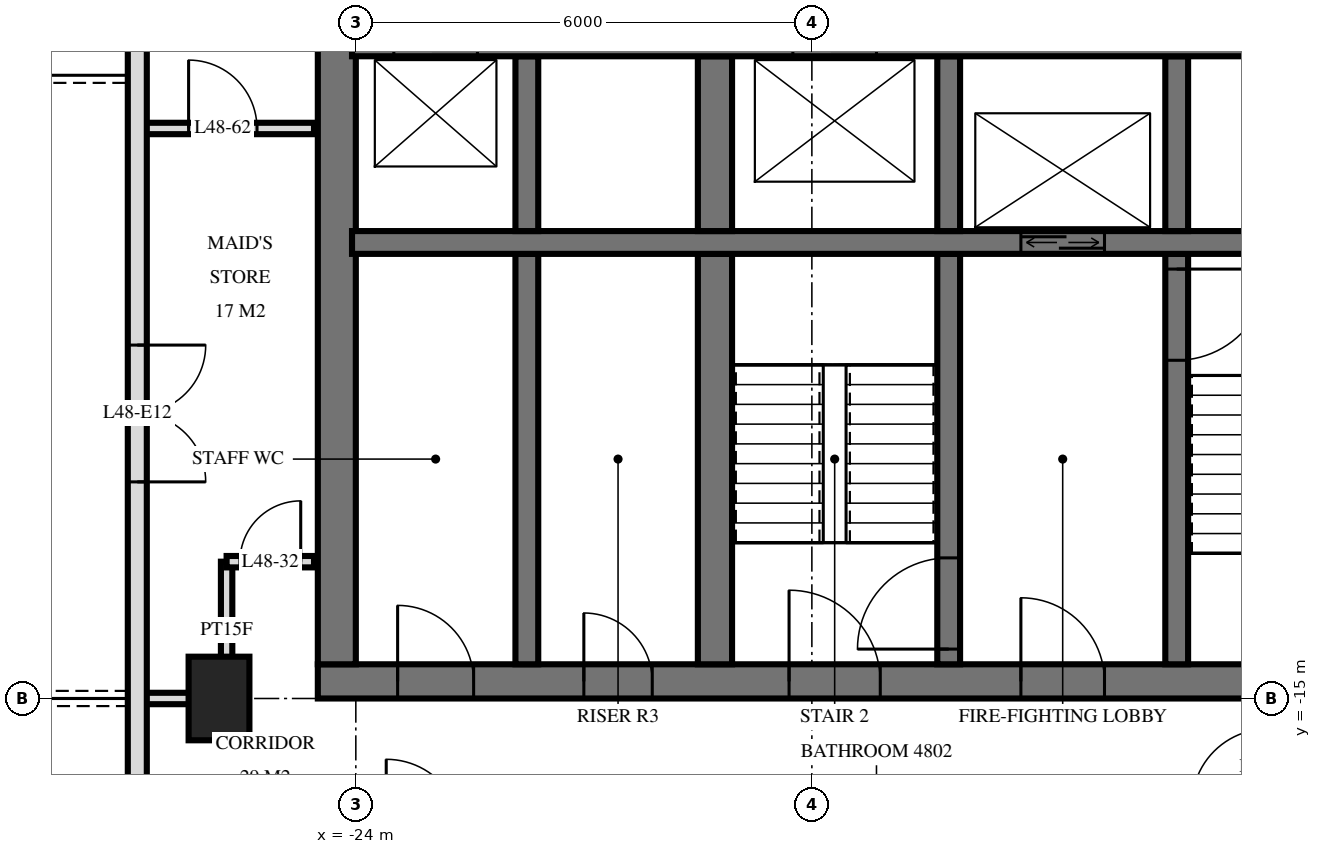
"""IFC4 building model, lengths in metres.
Left out: names, types, materials, properties, quantities, classifications, styles, units other than length and angle.
Written with IfcOpenShell. Run it as: python <this file> out.ifc"""

import sys

from ifc_helpers import new_model, si_unit, direction, frame, frame_2d, origin, origin_2d, place, context, subcontext, project, spatial, rectangle, extrude, element, fill, save


model = new_model("IFC4")
c1 = context("Model", 3, precision=1e-05, world=origin(), true_north=direction((0.0, 1.0)))
c2 = subcontext(c1, "Body", "Model", "MODEL_VIEW")
j1 = project(units=[si_unit("LENGTHUNIT", "METRE"), si_unit("PLANEANGLEUNIT", "RADIAN")], contexts=[c1])
p1 = place(None, origin())
s1 = spatial("IfcSite", under=j1, at=p1, CompositionType="ELEMENT")
p2 = place(p1, origin())
s2 = spatial("IfcBuilding", under=s1, at=p2, CompositionType="ELEMENT")
p3 = place(p2, frame((0.0, 0.0, 187.1)))
s3 = spatial("IfcBuildingStorey", under=s2, at=p3, CompositionType="ELEMENT", Elevation=187.1)
p4 = place(p3, frame((-25.8, -15.0, 0.0), z_axis=(0.0, 0.0, 1.0), x_axis=(0.0, 1.0, 0.0)))
e1 = element("IfcColumn", 1, at=p4, inside=s3, PredefinedType="COLUMN", context=c2, shape_type="SweptSolid", body=[
    extrude(rectangle(XDim=1.1, YDim=0.8, at=origin_2d()), origin(), (0.0, 0.0, 1.0), 3.5),
])
p5 = place(p3, frame((-24.5, -14.775, 0.0), z_axis=(0.0, 0.0, 1.0), x_axis=(1.0, 0.0, 0.0)))
e2 = element("IfcWall", 2, at=p5, inside=s3, PredefinedType="SHEAR", context=c2, shape_type="SweptSolid", body=[
    extrude(rectangle(XDim=14.5, YDim=0.45, at=frame_2d((7.25, 0.0))), origin(), (0.0, 0.0, 1.0), 3.5),
])
p6 = place(p5, frame((6.2, 0.0, 0.0)))
e3 = element("IfcOpeningElement", 3, at=p6, cuts=e2, PredefinedType="OPENING", context=c2, shape_type="SweptSolid", body=[
    extrude(rectangle(XDim=1.2, YDim=2.1, at=frame_2d((0.6, 1.05))), frame((0.0, 0.235, 0.0), z_axis=(0.0, -1.0, 0.0), x_axis=(1.0, 0.0, 0.0)), (0.0, 0.0, 1.0), 0.47),
])
p7 = place(p5, frame((9.25, 0.0, 0.0)))
e4 = element("IfcOpeningElement", 4, at=p7, cuts=e2, PredefinedType="OPENING", context=c2, shape_type="SweptSolid", body=[
    extrude(rectangle(XDim=1.1, YDim=2.1, at=frame_2d((0.55, 1.05))), frame((0.0, 0.235, 0.0), z_axis=(0.0, -1.0, 0.0), x_axis=(1.0, 0.0, 0.0)), (0.0, 0.0, 1.0), 0.47),
])
p8 = place(p5, frame((3.5, 0.0, 0.0)))
e5 = element("IfcOpeningElement", 5, at=p8, cuts=e2, PredefinedType="OPENING", context=c2, shape_type="SweptSolid", body=[
    extrude(rectangle(XDim=0.9, YDim=2.1, at=frame_2d((0.45, 1.05))), frame((0.0, 0.235, 0.0), z_axis=(0.0, -1.0, 0.0), x_axis=(1.0, 0.0, 0.0)), (0.0, 0.0, 1.0), 0.47),
])
p9 = place(p5, frame((1.05, 0.0, 0.0)))
e6 = element("IfcOpeningElement", 6, at=p9, cuts=e2, PredefinedType="OPENING", context=c2, shape_type="SweptSolid", body=[
    extrude(rectangle(XDim=1.0, YDim=2.1, at=frame_2d((0.5, 1.05))), frame((0.0, 0.235, 0.0), z_axis=(0.0, -1.0, 0.0), x_axis=(1.0, 0.0, 0.0)), (0.0, 0.0, 1.0), 0.47),
])
p10 = place(p3, frame((-24.25, -14.55, 0.0), z_axis=(0.0, 0.0, 1.0), x_axis=(0.0, 1.0, 0.0)))
e7 = element("IfcWall", 7, at=p10, inside=s3, PredefinedType="SHEAR", context=c2, shape_type="SweptSolid", body=[
    extrude(rectangle(XDim=14.1, YDim=0.5, at=frame_2d((7.05, 0.0))), origin(), (0.0, 0.0, 1.0), 3.5),
])
p11 = place(p3, frame((-24.05, -6.4, 0.0), z_axis=(0.0, 0.0, 1.0), x_axis=(1.0, 0.0, 0.0)))
e8 = element("IfcWall", 8, at=p11, inside=s3, PredefinedType="SHEAR", context=c2, shape_type="SweptSolid", body=[
    extrude(rectangle(XDim=13.7, YDim=0.3, at=frame_2d((6.85, 0.0))), origin(), (0.0, 0.0, 1.0), 3.5),
])
p12 = place(p11, frame((0.55, 0.0, 0.0)))
e9 = element("IfcOpeningElement", 9, at=p12, cuts=e8, PredefinedType="OPENING", context=c2, shape_type="SweptSolid", body=[
    extrude(rectangle(XDim=1.1, YDim=2.1, at=frame_2d((0.55, 1.05))), frame((0.0, 0.16, 0.0), z_axis=(0.0, -1.0, 0.0), x_axis=(1.0, 0.0, 0.0)), (0.0, 0.0, 1.0), 0.32),
])
p13 = place(p11, frame((5.8, 0.0, 0.0)))
e10 = element("IfcOpeningElement", 10, at=p13, cuts=e8, PredefinedType="OPENING", context=c2, shape_type="SweptSolid", body=[
    extrude(rectangle(XDim=1.1, YDim=2.1, at=frame_2d((0.55, 1.05))), frame((0.0, 0.16, 0.0), z_axis=(0.0, -1.0, 0.0), x_axis=(1.0, 0.0, 0.0)), (0.0, 0.0, 1.0), 0.32),
])
p14 = place(p3, frame((-24.05, -9.0, 0.0), z_axis=(0.0, 0.0, 1.0), x_axis=(1.0, 0.0, 0.0)))
e11 = element("IfcWall", 11, at=p14, inside=s3, PredefinedType="SHEAR", context=c2, shape_type="SweptSolid", body=[
    extrude(rectangle(XDim=13.7, YDim=0.3, at=frame_2d((6.85, 0.0))), origin(), (0.0, 0.0, 1.0), 3.5),
])
p15 = place(p14, frame((8.8, 0.0, 0.0)))
e12 = element("IfcOpeningElement", 12, at=p15, cuts=e11, PredefinedType="OPENING", context=c2, shape_type="SweptSolid", body=[
    extrude(rectangle(XDim=1.1, YDim=2.1, at=frame_2d((0.55, 1.05))), frame((0.0, 0.16, 0.0), z_axis=(0.0, -1.0, 0.0), x_axis=(1.0, 0.0, 0.0)), (0.0, 0.0, 1.0), 0.32),
])
p16 = place(p3, frame((-13.2, -8.85, 0.0), z_axis=(0.0, 0.0, 1.0), x_axis=(0.0, 1.0, 0.0)))
e13 = element("IfcWall", 13, at=p16, inside=s3, PredefinedType="SHEAR", context=c2, shape_type="SweptSolid", body=[
    extrude(rectangle(XDim=2.3, YDim=0.3, at=frame_2d((1.15, 0.0))), origin(), (0.0, 0.0, 1.0), 3.5),
])
p17 = place(p3, frame((-13.2, -14.55, 0.0), z_axis=(0.0, 0.0, 1.0), x_axis=(0.0, 1.0, 0.0)))
e14 = element("IfcWall", 14, at=p17, inside=s3, PredefinedType="SHEAR", context=c2, shape_type="SweptSolid", body=[
    extrude(rectangle(XDim=5.4, YDim=0.3, at=frame_2d((2.7, 0.0))), origin(), (0.0, 0.0, 1.0), 3.5),
])
p18 = place(p17, frame((4.0, 0.0, 0.0)))
e15 = element("IfcOpeningElement", 15, at=p18, cuts=e14, PredefinedType="OPENING", context=c2, shape_type="SweptSolid", body=[
    extrude(rectangle(XDim=1.2, YDim=2.1, at=frame_2d((0.6, 1.05))), frame((0.0, 0.16, 0.0), z_axis=(0.0, -1.0, 0.0), x_axis=(1.0, 0.0, 0.0)), (0.0, 0.0, 1.0), 0.32),
])
p19 = place(p3, frame((-16.2, -8.85, 0.0), z_axis=(0.0, 0.0, 1.0), x_axis=(0.0, 1.0, 0.0)))
e16 = element("IfcWall", 16, at=p19, inside=s3, PredefinedType="SHEAR", context=c2, shape_type="SweptSolid", body=[
    extrude(rectangle(XDim=2.3, YDim=0.3, at=frame_2d((1.15, 0.0))), origin(), (0.0, 0.0, 1.0), 3.5),
])
p20 = place(p3, frame((-16.2, -14.55, 0.0), z_axis=(0.0, 0.0, 1.0), x_axis=(0.0, 1.0, 0.0)))
e17 = element("IfcWall", 17, at=p20, inside=s3, PredefinedType="SHEAR", context=c2, shape_type="SweptSolid", body=[
    extrude(rectangle(XDim=5.4, YDim=0.3, at=frame_2d((2.7, 0.0))), origin(), (0.0, 0.0, 1.0), 3.5),
])
p21 = place(p20, frame((0.2, 0.0, 0.0)))
e18 = element("IfcOpeningElement", 18, at=p21, cuts=e17, PredefinedType="OPENING", context=c2, shape_type="SweptSolid", body=[
    extrude(rectangle(XDim=1.2, YDim=2.1, at=frame_2d((0.6, 1.05))), frame((0.0, 0.16, 0.0), z_axis=(0.0, -1.0, 0.0), x_axis=(1.0, 0.0, 0.0)), (0.0, 0.0, 1.0), 0.32),
])
p22 = place(p3, frame((-19.275, -8.85, 0.0), z_axis=(0.0, 0.0, 1.0), x_axis=(0.0, 1.0, 0.0)))
e19 = element("IfcWall", 19, at=p22, inside=s3, PredefinedType="SHEAR", context=c2, shape_type="SweptSolid", body=[
    extrude(rectangle(XDim=2.3, YDim=0.45, at=frame_2d((1.15, 0.0))), origin(), (0.0, 0.0, 1.0), 3.5),
])
p23 = place(p3, frame((-19.275, -14.55, 0.0), z_axis=(0.0, 0.0, 1.0), x_axis=(0.0, 1.0, 0.0)))
e20 = element("IfcWall", 20, at=p23, inside=s3, PredefinedType="SHEAR", context=c2, shape_type="SweptSolid", body=[
    extrude(rectangle(XDim=5.4, YDim=0.45, at=frame_2d((2.7, 0.0))), origin(), (0.0, 0.0, 1.0), 3.5),
])
p24 = place(p3, frame((-21.75, -8.85, 0.0), z_axis=(0.0, 0.0, 1.0), x_axis=(0.0, 1.0, 0.0)))
e21 = element("IfcWall", 21, at=p24, inside=s3, PredefinedType="SHEAR", context=c2, shape_type="SweptSolid", body=[
    extrude(rectangle(XDim=2.3, YDim=0.3, at=frame_2d((1.15, 0.0))), origin(), (0.0, 0.0, 1.0), 3.5),
])
p25 = place(p3, frame((-21.75, -14.55, 0.0), z_axis=(0.0, 0.0, 1.0), x_axis=(0.0, 1.0, 0.0)))
e22 = element("IfcWall", 22, at=p25, inside=s3, PredefinedType="SHEAR", context=c2, shape_type="SweptSolid", body=[
    extrude(rectangle(XDim=5.4, YDim=0.3, at=frame_2d((2.7, 0.0))), origin(), (0.0, 0.0, 1.0), 3.5),
])
p26 = place(p3, frame((-26.875, -3.325, 0.0), z_axis=(0.0, 0.0, 1.0), x_axis=(0.0, -1.0, 0.0)))
e23 = element("IfcWall", 23, at=p26, inside=s3, PredefinedType="SOLIDWALL", context=c2, shape_type="SweptSolid", body=[
    extrude(rectangle(XDim=21.551, YDim=0.25, at=frame_2d((10.775, 0.0))), origin(), (0.0, 0.0, 1.0), 3.22),
])
p27 = place(p26, frame((7.025, 0.0, 0.0)))
e24 = element("IfcOpeningElement", 24, at=p27, cuts=e23, PredefinedType="OPENING", context=c2, shape_type="SweptSolid", body=[
    extrude(rectangle(XDim=1.8, YDim=2.4, at=frame_2d((0.9, 1.2))), frame((0.0, 0.135, 0.0), z_axis=(0.0, -1.0, 0.0), x_axis=(1.0, 0.0, 0.0)), (0.0, 0.0, 1.0), 0.27),
])
p28 = place(p26, frame((14.075, 0.0, 0.0)))
e25 = element("IfcOpeningElement", 25, at=p28, cuts=e23, PredefinedType="OPENING", context=c2, shape_type="SweptSolid", body=[
    extrude(rectangle(XDim=1.8, YDim=2.4, at=frame_2d((0.9, 1.2))), frame((0.0, 0.135, 0.0), z_axis=(0.0, -1.0, 0.0), x_axis=(1.0, 0.0, 0.0)), (0.0, 0.0, 1.0), 0.27),
])
p29 = place(p26, frame((18.875, 0.0, 0.0)))
e26 = element("IfcOpeningElement", 26, at=p29, cuts=e23, PredefinedType="OPENING", context=c2, shape_type="SweptSolid", body=[
    extrude(rectangle(XDim=1.8, YDim=2.4, at=frame_2d((0.9, 1.2))), frame((0.0, 0.135, 0.0), z_axis=(0.0, -1.0, 0.0), x_axis=(1.0, 0.0, 0.0)), (0.0, 0.0, 1.0), 0.27),
])
p30 = place(p3, frame((-25.7, -15.0, 0.0), z_axis=(0.0, 0.0, 1.0), x_axis=(0.0, 1.0, 0.0)))
e27 = element("IfcWall", 27, at=p30, inside=s3, PredefinedType="PARTITIONING", context=c2, shape_type="SweptSolid", body=[
    extrude(rectangle(XDim=1.8, YDim=0.15, at=frame_2d((0.9, 0.0))), origin(), (0.0, 0.0, 1.0), 3.22),
])
p31 = place(p3, frame((-26.82, -15.0, 0.0), z_axis=(0.0, 0.0, 1.0), x_axis=(1.0, 0.0, 0.0)))
e28 = element("IfcWall", 28, at=p31, inside=s3, PredefinedType="PARTITIONING", context=c2, shape_type="SweptSolid", body=[
    extrude(rectangle(XDim=1.12, YDim=0.15, at=frame_2d((0.56, 0.0))), origin(), (0.0, 0.0, 1.0), 3.22),
])
p32 = place(p3, frame((-25.7, -13.2, 0.0), z_axis=(0.0, 0.0, 1.0), x_axis=(1.0, 0.0, 0.0)))
e29 = element("IfcWall", 29, at=p32, inside=s3, PredefinedType="PARTITIONING", context=c2, shape_type="SweptSolid", body=[
    extrude(rectangle(XDim=1.15, YDim=0.15, at=frame_2d((0.575, 0.0))), origin(), (0.0, 0.0, 1.0), 3.22),
])
p33 = place(p32, frame((0.175, 0.0, 0.0)))
e30 = element("IfcOpeningElement", 30, at=p33, cuts=e29, PredefinedType="OPENING", context=c2, shape_type="SweptSolid", body=[
    extrude(rectangle(XDim=0.8, YDim=2.1, at=frame_2d((0.4, 1.05))), frame((0.0, 0.085, 0.0), z_axis=(0.0, -1.0, 0.0), x_axis=(1.0, 0.0, 0.0)), (0.0, 0.0, 1.0), 0.17),
])
p34 = place(p3, frame((-26.82, -7.5, 0.0), z_axis=(0.0, 0.0, 1.0), x_axis=(1.0, 0.0, 0.0)))
e31 = element("IfcWall", 31, at=p34, inside=s3, PredefinedType="PARTITIONING", context=c2, shape_type="SweptSolid", body=[
    extrude(rectangle(XDim=2.27, YDim=0.15, at=frame_2d((1.135, 0.0))), origin(), (0.0, 0.0, 1.0), 3.22),
])
p35 = place(p34, frame((0.62, 0.0, 0.0)))
e32 = element("IfcOpeningElement", 32, at=p35, cuts=e31, PredefinedType="OPENING", context=c2, shape_type="SweptSolid", body=[
    extrude(rectangle(XDim=0.9, YDim=2.1, at=frame_2d((0.45, 1.05))), frame((0.0, 0.085, 0.0), z_axis=(0.0, -1.0, 0.0), x_axis=(1.0, 0.0, 0.0)), (0.0, 0.0, 1.0), 0.17),
])
p36 = place(p27, origin())
e33 = element("IfcDoor", 33, at=p36, inside=s3, OperationType="DOUBLE_DOOR_SINGLE_SWING", PredefinedType="DOOR", context=c2, shape_type="SweptSolid", body=[
    extrude(rectangle(XDim=1.8, YDim=2.4, at=frame_2d((0.9, 1.2))), frame((0.0, 0.025, 0.0), z_axis=(0.0, -1.0, 0.0), x_axis=(1.0, 0.0, 0.0)), (0.0, 0.0, 1.0), 0.05),
])
fill(e24, e33)
p37 = place(p15, origin())
e34 = element("IfcDoor", 34, at=p37, inside=s3, OperationType="DOUBLE_DOOR_SLIDING", PredefinedType="USERDEFINED", context=c2, shape_type="SweptSolid", body=[
    extrude(rectangle(XDim=1.1, YDim=2.1, at=frame_2d((0.55, 1.05))), frame((0.0, 0.025, 0.0), z_axis=(0.0, -1.0, 0.0), x_axis=(1.0, 0.0, 0.0)), (0.0, 0.0, 1.0), 0.05),
])
fill(e12, e34)
p38 = place(p6, origin())
e35 = element("IfcDoor", 35, at=p38, inside=s3, OperationType="SINGLE_SWING_RIGHT", PredefinedType="DOOR", context=c2, shape_type="SweptSolid", body=[
    extrude(rectangle(XDim=1.2, YDim=2.1, at=frame_2d((0.6, 1.05))), frame((0.0, 0.025, 0.0), z_axis=(0.0, -1.0, 0.0), x_axis=(1.0, 0.0, 0.0)), (0.0, 0.0, 1.0), 0.05),
])
fill(e3, e35)
p39 = place(p7, origin())
e36 = element("IfcDoor", 36, at=p39, inside=s3, OperationType="SINGLE_SWING_RIGHT", PredefinedType="DOOR", context=c2, shape_type="SweptSolid", body=[
    extrude(rectangle(XDim=1.1, YDim=2.1, at=frame_2d((0.55, 1.05))), frame((0.0, 0.025, 0.0), z_axis=(0.0, -1.0, 0.0), x_axis=(1.0, 0.0, 0.0)), (0.0, 0.0, 1.0), 0.05),
])
fill(e4, e36)
p40 = place(p8, origin())
e37 = element("IfcDoor", 37, at=p40, inside=s3, OperationType="SINGLE_SWING_RIGHT", PredefinedType="DOOR", context=c2, shape_type="SweptSolid", body=[
    extrude(rectangle(XDim=0.9, YDim=2.1, at=frame_2d((0.45, 1.05))), frame((0.0, 0.025, 0.0), z_axis=(0.0, -1.0, 0.0), x_axis=(1.0, 0.0, 0.0)), (0.0, 0.0, 1.0), 0.05),
])
fill(e5, e37)
p41 = place(p9, origin())
e38 = element("IfcDoor", 38, at=p41, inside=s3, OperationType="SINGLE_SWING_RIGHT", PredefinedType="DOOR", context=c2, shape_type="SweptSolid", body=[
    extrude(rectangle(XDim=1.0, YDim=2.1, at=frame_2d((0.5, 1.05))), frame((0.0, 0.025, 0.0), z_axis=(0.0, -1.0, 0.0), x_axis=(1.0, 0.0, 0.0)), (0.0, 0.0, 1.0), 0.05),
])
fill(e6, e38)
p42 = place(p18, frame((0.6, 0.0, 0.0), z_axis=(0.0, 0.0, 1.0), x_axis=(-1.0, 0.0, 0.0)))
e39 = element("IfcDoor", 39, at=p42, inside=s3, OperationType="SINGLE_SWING_RIGHT", PredefinedType="DOOR", context=c2, shape_type="SweptSolid", body=[
    extrude(rectangle(XDim=1.2, YDim=2.1, at=frame_2d((0.0, 1.05))), frame((0.0, -0.025, 0.0), z_axis=(0.0, 1.0, 0.0), x_axis=(-1.0, 0.0, 0.0)), (0.0, 0.0, 1.0), 0.05),
])
fill(e15, e39)
p43 = place(p21, origin())
e40 = element("IfcDoor", 40, at=p43, inside=s3, OperationType="SINGLE_SWING_RIGHT", PredefinedType="DOOR", context=c2, shape_type="SweptSolid", body=[
    extrude(rectangle(XDim=1.2, YDim=2.1, at=frame_2d((0.6, 1.05))), frame((0.0, 0.025, 0.0), z_axis=(0.0, -1.0, 0.0), x_axis=(1.0, 0.0, 0.0)), (0.0, 0.0, 1.0), 0.05),
])
fill(e18, e40)
p44 = place(p33, origin())
e41 = element("IfcDoor", 41, at=p44, inside=s3, OperationType="SINGLE_SWING_LEFT", PredefinedType="DOOR", context=c2, shape_type="SweptSolid", body=[
    extrude(rectangle(XDim=0.8, YDim=2.1, at=frame_2d((0.4, 1.05))), frame((0.0, 0.025, 0.0), z_axis=(0.0, -1.0, 0.0), x_axis=(1.0, 0.0, 0.0)), (0.0, 0.0, 1.0), 0.05),
])
fill(e30, e41)
p45 = place(p35, origin())
e42 = element("IfcDoor", 42, at=p45, inside=s3, OperationType="SINGLE_SWING_RIGHT", PredefinedType="DOOR", context=c2, shape_type="SweptSolid", body=[
    extrude(rectangle(XDim=0.9, YDim=2.1, at=frame_2d((0.45, 1.05))), frame((0.0, 0.025, 0.0), z_axis=(0.0, -1.0, 0.0), x_axis=(1.0, 0.0, 0.0)), (0.0, 0.0, 1.0), 0.05),
])
fill(e32, e42)
save(model, sys.argv[1])
